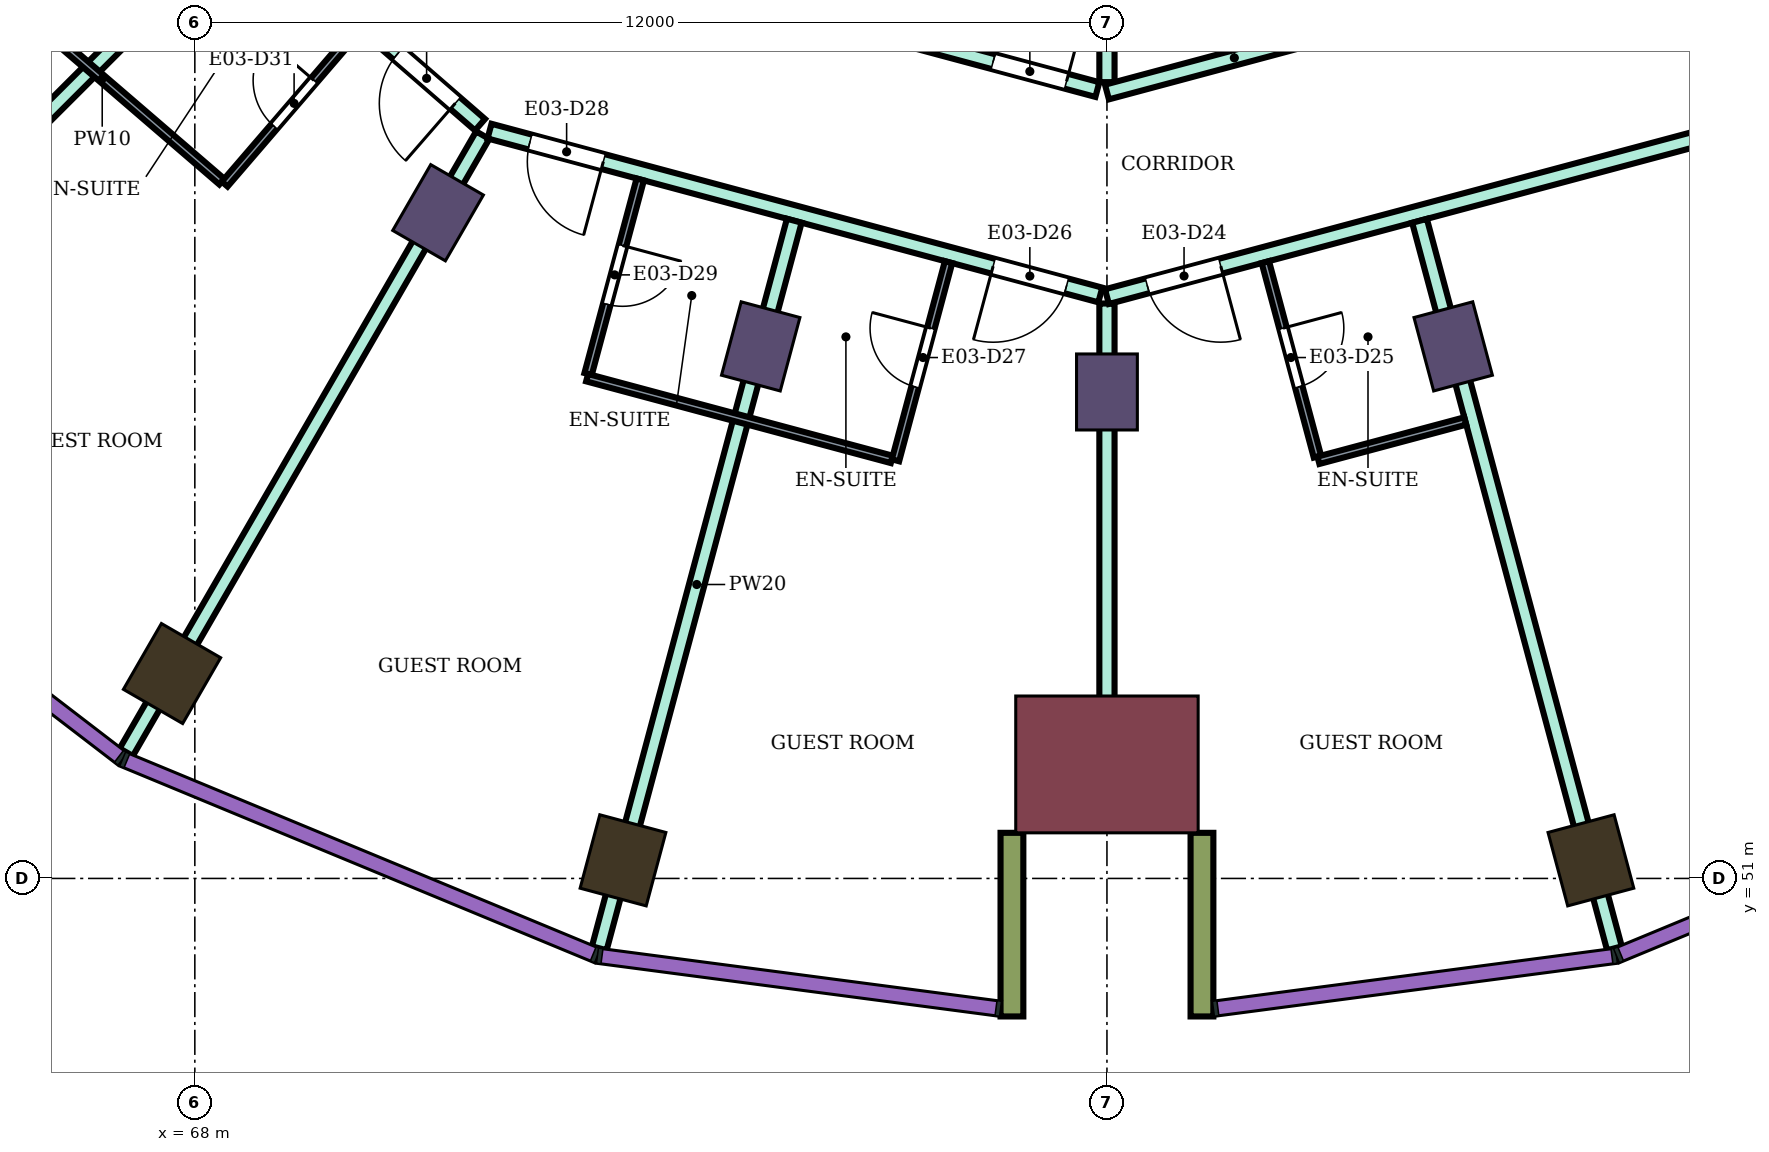
"""IFC4 building model, lengths in metres.
Left out: names, types, materials, properties, quantities, classifications, styles, units other than length and angle.
Written with IfcOpenShell. Run it as: python <this file> out.ifc"""

import sys

from ifc_helpers import new_model, si_unit, direction, frame, frame_2d, origin, origin_2d, place, context, subcontext, project, spatial, rectangle, extrude, element, fill, save


model = new_model("IFC4")
c1 = context("Model", 3, precision=1e-05, world=origin(), true_north=direction((0.0, 1.0)))
c2 = subcontext(c1, "Body", "Model", "MODEL_VIEW")
j1 = project(units=[si_unit("LENGTHUNIT", "METRE"), si_unit("PLANEANGLEUNIT", "RADIAN")], contexts=[c1])
p1 = place(None, origin())
s1 = spatial("IfcSite", under=j1, at=p1, CompositionType="ELEMENT")
p2 = place(p1, origin())
s2 = spatial("IfcBuilding", under=s1, at=p2, CompositionType="ELEMENT")
p3 = place(p2, frame((0.0, 0.0, 138.0)))
s3 = spatial("IfcBuildingStorey", under=s2, at=p3, CompositionType="ELEMENT", Elevation=138.0)
for number, where, z_axis, x_axis in (
    (1, (67.7, 53.696, 0.0), (0.0, 0.0, 1.0), (-0.5, -0.866, 0.0)),
    (2, (73.633, 51.238, 0.0), (0.0, 0.0, 1.0), (-0.259, -0.966, 0.0)),
    (3, (86.367, 51.238, 0.0), (0.0, 0.0, 1.0), (0.259, -0.966, 0.0)),
):
    element("IfcColumn", number, at=place(p3, frame(where, z_axis=z_axis, x_axis=x_axis)), inside=s3, PredefinedType="COLUMN", context=c2, shape_type="SweptSolid", body=[
        extrude(rectangle(XDim=1.0, YDim=0.9, at=origin_2d()), origin(), (0.0, 0.0, 1.0), 3.9),
    ])
for number, where, z_axis, x_axis in (
    (4, (71.2, 59.758, 0.0), (0.0, 0.0, 1.0), (-0.5, -0.866, 0.0)),
    (5, (75.445, 58.0, 0.0), (0.0, 0.0, 1.0), (-0.259, -0.966, 0.0)),
    (6, (80.0, 57.4, 0.0), (0.0, 0.0, 1.0), (0.0, -1.0, 0.0)),
    (7, (84.555, 58.0, 0.0), (0.0, 0.0, 1.0), (0.259, -0.966, 0.0)),
):
    element("IfcColumn", number, at=place(p3, frame(where, z_axis=z_axis, x_axis=x_axis)), inside=s3, PredefinedType="COLUMN", context=c2, shape_type="SweptSolid", body=[
        extrude(rectangle(XDim=1.0, YDim=0.8, at=origin_2d()), origin(), (0.0, 0.0, 1.0), 3.9),
    ])
p4 = place(p3, frame((80.0, 52.5, 0.0), z_axis=(0.0, 0.0, 1.0), x_axis=(0.0, -1.0, 0.0)))
e8 = element("IfcColumn", 8, at=p4, inside=s3, PredefinedType="COLUMN", context=c2, shape_type="SweptSolid", body=[
    extrude(rectangle(XDim=1.8, YDim=2.4, at=origin_2d()), origin(), (0.0, 0.0, 1.0), 3.9),
])
for number, where, z_axis, x_axis in (
    (9, (78.75, 51.6, 0.0), (0.0, 0.0, 1.0), (0.0, -1.0, 0.0)),
    (10, (81.25, 51.6, 0.0), (0.0, 0.0, 1.0), (0.0, -1.0, 0.0)),
):
    element("IfcWall", number, at=place(p3, frame(where, z_axis=z_axis, x_axis=x_axis)), inside=s3, PredefinedType="NOTDEFINED", context=c2, shape_type="SweptSolid", body=[
        extrude(rectangle(XDim=2.416, YDim=0.3, at=frame_2d((1.208, 0.0))), origin(), (0.0, 0.0, 1.0), 3.9),
    ])
p5 = place(p3, frame((63.593, 58.599, 0.0), z_axis=(0.0, 0.0, 1.0), x_axis=(0.707228748718, 0.706984792613, 0.0)))
e11 = element("IfcWall", 11, at=p5, inside=s3, PredefinedType="PARTITIONING", context=c2, shape_type="SweptSolid", body=[
    extrude(rectangle(XDim=7.005, YDim=0.2, at=frame_2d((3.503, 0.0))), origin(), (0.0, 0.0, 1.0), 3.45),
])
p6 = place(p3, frame((67.082, 64.972, 0.0), z_axis=(0.0, 0.0, 1.0), x_axis=(0.755031061605, -0.65568902386, 0.0)))
e12 = element("IfcWall", 12, at=p6, inside=s3, PredefinedType="PARTITIONING", context=c2, shape_type="SweptSolid", body=[
    extrude(rectangle(XDim=6.186, YDim=0.2, at=frame_2d((3.093, 0.0))), origin(), (0.0, 0.0, 1.0), 3.45),
])
p7 = place(p6, frame((4.755, 0.0, 0.0)))
e13 = element("IfcOpeningElement", 13, at=p7, cuts=e12, PredefinedType="OPENING", context=c2, shape_type="SweptSolid", body=[
    extrude(rectangle(XDim=1.0, YDim=2.1, at=frame_2d((0.5, 1.05))), frame((0.0, 0.11, 0.0), z_axis=(0.0, -1.0, 0.0), x_axis=(1.0, 0.0, 0.0)), (0.0, 0.0, 1.0), 0.22),
])
p8 = place(p3, frame((67.097, 52.661, 0.0), z_axis=(0.0, 0.0, 1.0), x_axis=(0.500236379769, 0.865888886841, 0.0)))
e14 = element("IfcWall", 14, at=p8, inside=s3, PredefinedType="PARTITIONING", context=c2, shape_type="SweptSolid", body=[
    extrude(rectangle(XDim=9.375, YDim=0.2, at=frame_2d((4.688, 0.0))), origin(), (0.0, 0.0, 1.0), 3.45),
])
p9 = place(p3, frame((71.877, 60.832, 0.0), z_axis=(0.0, 0.0, 1.0), x_axis=(0.965852509869, -0.259092510851, 0.0)))
e15 = element("IfcWall", 15, at=p9, inside=s3, PredefinedType="PARTITIONING", context=c2, shape_type="SweptSolid", body=[
    extrude(rectangle(XDim=8.32, YDim=0.2, at=frame_2d((4.16, 0.0))), origin(), (0.0, 0.0, 1.0), 3.45),
])
p10 = place(p9, frame((6.86, 0.0, 0.0)))
e16 = element("IfcOpeningElement", 16, at=p10, cuts=e15, PredefinedType="OPENING", context=c2, shape_type="SweptSolid", body=[
    extrude(rectangle(XDim=1.0, YDim=2.1, at=frame_2d((0.5, 1.05))), frame((0.0, 0.11, 0.0), z_axis=(0.0, -1.0, 0.0), x_axis=(1.0, 0.0, 0.0)), (0.0, 0.0, 1.0), 0.22),
])
p11 = place(p9, frame((0.55, 0.0, 0.0)))
e17 = element("IfcOpeningElement", 17, at=p11, cuts=e15, PredefinedType="OPENING", context=c2, shape_type="SweptSolid", body=[
    extrude(rectangle(XDim=1.0, YDim=2.1, at=frame_2d((0.5, 1.05))), frame((0.0, 0.11, 0.0), z_axis=(0.0, -1.0, 0.0), x_axis=(1.0, 0.0, 0.0)), (0.0, 0.0, 1.0), 0.22),
])
p12 = place(p3, frame((73.297, 63.143, 0.0), z_axis=(0.0, 0.0, 1.0), x_axis=(0.965859030528, -0.25906820173, 0.0)))
e18 = element("IfcWall", 18, at=p12, inside=s3, PredefinedType="PARTITIONING", context=c2, shape_type="SweptSolid", body=[
    extrude(rectangle(XDim=6.81, YDim=0.2, at=frame_2d((3.405, 0.0))), origin(), (0.0, 0.0, 1.0), 3.45),
])
p13 = place(p12, frame((5.39, 0.0, 0.0)))
e19 = element("IfcOpeningElement", 19, at=p13, cuts=e18, PredefinedType="OPENING", context=c2, shape_type="SweptSolid", body=[
    extrude(rectangle(XDim=1.0, YDim=2.1, at=frame_2d((0.5, 1.05))), frame((0.0, 0.11, 0.0), z_axis=(0.0, -1.0, 0.0), x_axis=(1.0, 0.0, 0.0)), (0.0, 0.0, 1.0), 0.22),
])
p14 = place(p3, frame((73.321, 50.081, 0.0), z_axis=(0.0, 0.0, 1.0), x_axis=(0.258889198551, 0.965907025999, 0.0)))
e20 = element("IfcWall", 20, at=p14, inside=s3, PredefinedType="PARTITIONING", context=c2, shape_type="SweptSolid", body=[
    extrude(rectangle(XDim=9.909, YDim=0.2, at=frame_2d((4.955, 0.0))), origin(), (0.0, 0.0, 1.0), 3.45),
])
p15 = place(p3, frame((80.0, 51.8, 0.0), z_axis=(0.0, 0.0, 1.0), x_axis=(0.0, 1.0, 0.0)))
e21 = element("IfcWall", 21, at=p15, inside=s3, PredefinedType="PARTITIONING", context=c2, shape_type="SweptSolid", body=[
    extrude(rectangle(XDim=6.764, YDim=0.2, at=frame_2d((3.382, 0.0))), origin(), (0.0, 0.0, 1.0), 3.45),
])
p16 = place(p3, frame((80.0, 58.654, 0.0), z_axis=(0.0, 0.0, 1.0), x_axis=(0.965979808777, 0.25861749561, 0.0)))
e22 = element("IfcWall", 22, at=p16, inside=s3, PredefinedType="PARTITIONING", context=c2, shape_type="SweptSolid", body=[
    extrude(rectangle(XDim=8.37, YDim=0.2, at=frame_2d((4.185, 0.0))), origin(), (0.0, 0.0, 1.0), 3.45),
])
p17 = place(p16, frame((0.55, 0.0, 0.0)))
e23 = element("IfcOpeningElement", 23, at=p17, cuts=e22, PredefinedType="OPENING", context=c2, shape_type="SweptSolid", body=[
    extrude(rectangle(XDim=1.0, YDim=2.1, at=frame_2d((0.5, 1.05))), frame((0.0, 0.11, 0.0), z_axis=(0.0, -1.0, 0.0), x_axis=(1.0, 0.0, 0.0)), (0.0, 0.0, 1.0), 0.22),
])
p18 = place(p3, frame((80.0, 61.476, 0.0), z_axis=(0.0, 0.0, 1.0), x_axis=(0.0, 1.0, 0.0)))
e24 = element("IfcWall", 24, at=p18, inside=s3, PredefinedType="PARTITIONING", context=c2, shape_type="SweptSolid", body=[
    extrude(rectangle(XDim=5.825, YDim=0.2, at=frame_2d((2.913, 0.0))), origin(), (0.0, 0.0, 1.0), 3.45),
])
p19 = place(p3, frame((80.0, 61.346, 0.0), z_axis=(0.0, 0.0, 1.0), x_axis=(0.965915385935, 0.25885800589, 0.0)))
e25 = element("IfcWall", 25, at=p19, inside=s3, PredefinedType="PARTITIONING", context=c2, shape_type="SweptSolid", body=[
    extrude(rectangle(XDim=6.94, YDim=0.2, at=frame_2d((3.47, 0.0))), origin(), (0.0, 0.0, 1.0), 3.45),
])
p20 = place(p19, frame((3.094, 0.0, 0.0)))
e26 = element("IfcOpeningElement", 26, at=p20, cuts=e25, PredefinedType="OPENING", context=c2, shape_type="SweptSolid", body=[
    extrude(rectangle(XDim=0.9, YDim=2.1, at=frame_2d((0.45, 1.05))), frame((0.0, 0.11, 0.0), z_axis=(0.0, -1.0, 0.0), x_axis=(1.0, 0.0, 0.0)), (0.0, 0.0, 1.0), 0.22),
])
p21 = place(p3, frame((84.112, 59.652, 0.0), z_axis=(0.0, 0.0, 1.0), x_axis=(0.25878658041, -0.965934524593, 0.0)))
e27 = element("IfcWall", 27, at=p21, inside=s3, PredefinedType="PARTITIONING", context=c2, shape_type="SweptSolid", body=[
    extrude(rectangle(XDim=9.909, YDim=0.2, at=frame_2d((4.954, 0.0))), origin(), (0.0, 0.0, 1.0), 3.45),
])
p22 = place(p3, frame((65.208, 62.875, 0.0), z_axis=(0.0, 0.0, 1.0), x_axis=(0.757943251005, -0.652320495045, 0.0)))
e28 = element("IfcWall", 28, at=p22, inside=s3, PredefinedType="PARTITIONING", context=c2, shape_type="SweptSolid", body=[
    extrude(rectangle(XDim=4.151, YDim=0.1, at=frame_2d((2.076, 0.0))), origin(), (0.0, 0.0, 1.0), 3.45),
])
p23 = place(p3, frame((68.393, 60.135, 0.0), z_axis=(0.0, 0.0, 1.0), x_axis=(0.652061182569, 0.758166349944, 0.0)))
e29 = element("IfcWall", 29, at=p23, inside=s3, PredefinedType="PARTITIONING", context=c2, shape_type="SweptSolid", body=[
    extrude(rectangle(XDim=2.69, YDim=0.1, at=frame_2d((1.345, 0.0))), origin(), (0.0, 0.0, 1.0), 3.45),
])
p24 = place(p23, frame((1.0, 0.0, 0.0)))
e30 = element("IfcOpeningElement", 30, at=p24, cuts=e29, PredefinedType="OPENING", context=c2, shape_type="SweptSolid", body=[
    extrude(rectangle(XDim=0.8, YDim=2.1, at=frame_2d((0.4, 1.05))), frame((0.0, 0.06, 0.0), z_axis=(0.0, -1.0, 0.0), x_axis=(1.0, 0.0, 0.0)), (0.0, 0.0, 1.0), 0.12),
])
p25 = place(p3, frame((73.174, 57.636, 0.0), z_axis=(0.0, 0.0, 1.0), x_axis=(0.258952498977, 0.96589005755, 0.0)))
e31 = element("IfcWall", 31, at=p25, inside=s3, PredefinedType="PARTITIONING", context=c2, shape_type="SweptSolid", body=[
    extrude(rectangle(XDim=2.65, YDim=0.1, at=frame_2d((1.325, 0.0))), origin(), (0.0, 0.0, 1.0), 3.45),
])
p26 = place(p25, frame((0.95, 0.0, 0.0)))
e32 = element("IfcOpeningElement", 32, at=p26, cuts=e31, PredefinedType="OPENING", context=c2, shape_type="SweptSolid", body=[
    extrude(rectangle(XDim=0.8, YDim=2.1, at=frame_2d((0.4, 1.05))), frame((0.0, 0.06, 0.0), z_axis=(0.0, -1.0, 0.0), x_axis=(1.0, 0.0, 0.0)), (0.0, 0.0, 1.0), 0.12),
])
p27 = place(p3, frame((73.161, 57.588, 0.0), z_axis=(0.0, 0.0, 1.0), x_axis=(0.965858994467, -0.259068336173, 0.0)))
e33 = element("IfcWall", 33, at=p27, inside=s3, PredefinedType="PARTITIONING", context=c2, shape_type="SweptSolid", body=[
    extrude(rectangle(XDim=4.15, YDim=0.1, at=frame_2d((2.075, 0.0))), origin(), (0.0, 0.0, 1.0), 3.45),
])
p28 = place(p3, frame((77.218, 56.501, 0.0), z_axis=(0.0, 0.0, 1.0), x_axis=(0.258591408257, 0.965986792651, 0.0)))
e34 = element("IfcWall", 34, at=p28, inside=s3, PredefinedType="PARTITIONING", context=c2, shape_type="SweptSolid", body=[
    extrude(rectangle(XDim=2.699, YDim=0.1, at=frame_2d((1.35, 0.0))), origin(), (0.0, 0.0, 1.0), 3.45),
])
p29 = place(p28, frame((1.0, 0.0, 0.0)))
e35 = element("IfcOpeningElement", 35, at=p29, cuts=e34, PredefinedType="OPENING", context=c2, shape_type="SweptSolid", body=[
    extrude(rectangle(XDim=0.8, YDim=2.1, at=frame_2d((0.4, 1.05))), frame((0.0, 0.06, 0.0), z_axis=(0.0, -1.0, 0.0), x_axis=(1.0, 0.0, 0.0)), (0.0, 0.0, 1.0), 0.12),
])
p30 = place(p3, frame((82.084, 59.108, 0.0), z_axis=(0.0, 0.0, 1.0), x_axis=(0.258591746437, -0.965986702121, 0.0)))
e36 = element("IfcWall", 36, at=p30, inside=s3, PredefinedType="PARTITIONING", context=c2, shape_type="SweptSolid", body=[
    extrude(rectangle(XDim=2.649, YDim=0.1, at=frame_2d((1.325, 0.0))), origin(), (0.0, 0.0, 1.0), 3.45),
])
p31 = place(p30, frame((0.9, 0.0, 0.0)))
e37 = element("IfcOpeningElement", 37, at=p31, cuts=e36, PredefinedType="OPENING", context=c2, shape_type="SweptSolid", body=[
    extrude(rectangle(XDim=0.8, YDim=2.1, at=frame_2d((0.4, 1.05))), frame((0.0, 0.06, 0.0), z_axis=(0.0, -1.0, 0.0), x_axis=(1.0, 0.0, 0.0)), (0.0, 0.0, 1.0), 0.12),
])
p32 = place(p3, frame((82.782, 56.501, 0.0), z_axis=(0.0, 0.0, 1.0), x_axis=(0.966003594778, 0.258528634539, 0.0)))
e38 = element("IfcWall", 38, at=p32, inside=s3, PredefinedType="PARTITIONING", context=c2, shape_type="SweptSolid", body=[
    extrude(rectangle(XDim=2.0, YDim=0.1, at=frame_2d((1.0, 0.0))), origin(), (0.0, 0.0, 1.0), 3.45),
])
p33 = place(p17, frame((1.0, 0.0, 0.0), z_axis=(0.0, 0.0, 1.0), x_axis=(-1.0, 0.0, 0.0)))
e39 = element("IfcDoor", 39, at=p33, inside=s3, OperationType="SINGLE_SWING_LEFT", PredefinedType="DOOR", context=c2, shape_type="SweptSolid", body=[
    extrude(rectangle(XDim=1.0, YDim=2.1, at=frame_2d((0.5, 1.05))), frame((0.0, 0.025, 0.0), z_axis=(0.0, -1.0, 0.0), x_axis=(1.0, 0.0, 0.0)), (0.0, 0.0, 1.0), 0.05),
])
fill(e23, e39)
p34 = place(p31, origin())
e40 = element("IfcDoor", 40, at=p34, inside=s3, OperationType="SINGLE_SWING_LEFT", PredefinedType="DOOR", context=c2, shape_type="SweptSolid", body=[
    extrude(rectangle(XDim=0.8, YDim=2.1, at=frame_2d((0.4, 1.05))), frame((0.0, 0.025, 0.0), z_axis=(0.0, -1.0, 0.0), x_axis=(1.0, 0.0, 0.0)), (0.0, 0.0, 1.0), 0.05),
])
fill(e37, e40)
p35 = place(p10, frame((1.0, 0.0, 0.0), z_axis=(0.0, 0.0, 1.0), x_axis=(-1.0, 0.0, 0.0)))
e41 = element("IfcDoor", 41, at=p35, inside=s3, OperationType="SINGLE_SWING_RIGHT", PredefinedType="DOOR", context=c2, shape_type="SweptSolid", body=[
    extrude(rectangle(XDim=1.0, YDim=2.1, at=frame_2d((0.5, 1.05))), frame((0.0, 0.025, 0.0), z_axis=(0.0, -1.0, 0.0), x_axis=(1.0, 0.0, 0.0)), (0.0, 0.0, 1.0), 0.05),
])
fill(e16, e41)
p36 = place(p29, origin())
e42 = element("IfcDoor", 42, at=p36, inside=s3, OperationType="SINGLE_SWING_RIGHT", PredefinedType="DOOR", context=c2, shape_type="SweptSolid", body=[
    extrude(rectangle(XDim=0.8, YDim=2.1, at=frame_2d((0.4, 1.05))), frame((0.0, 0.025, 0.0), z_axis=(0.0, -1.0, 0.0), x_axis=(1.0, 0.0, 0.0)), (0.0, 0.0, 1.0), 0.05),
])
fill(e35, e42)
p37 = place(p11, frame((1.0, 0.0, 0.0), z_axis=(0.0, 0.0, 1.0), x_axis=(-1.0, 0.0, 0.0)))
e43 = element("IfcDoor", 43, at=p37, inside=s3, OperationType="SINGLE_SWING_LEFT", PredefinedType="DOOR", context=c2, shape_type="SweptSolid", body=[
    extrude(rectangle(XDim=1.0, YDim=2.1, at=frame_2d((0.5, 1.05))), frame((0.0, 0.025, 0.0), z_axis=(0.0, -1.0, 0.0), x_axis=(1.0, 0.0, 0.0)), (0.0, 0.0, 1.0), 0.05),
])
fill(e17, e43)
p38 = place(p26, frame((0.8, 0.0, 0.0), z_axis=(0.0, 0.0, 1.0), x_axis=(-1.0, 0.0, 0.0)))
e44 = element("IfcDoor", 44, at=p38, inside=s3, OperationType="SINGLE_SWING_LEFT", PredefinedType="DOOR", context=c2, shape_type="SweptSolid", body=[
    extrude(rectangle(XDim=0.8, YDim=2.1, at=frame_2d((0.4, 1.05))), frame((0.0, 0.025, 0.0), z_axis=(0.0, -1.0, 0.0), x_axis=(1.0, 0.0, 0.0)), (0.0, 0.0, 1.0), 0.05),
])
fill(e32, e44)
p39 = place(p7, frame((1.0, 0.0, 0.0), z_axis=(0.0, 0.0, 1.0), x_axis=(-1.0, 0.0, 0.0)))
e45 = element("IfcDoor", 45, at=p39, inside=s3, OperationType="SINGLE_SWING_LEFT", PredefinedType="DOOR", context=c2, shape_type="SweptSolid", body=[
    extrude(rectangle(XDim=1.0, YDim=2.1, at=frame_2d((0.5, 1.05))), frame((0.0, 0.025, 0.0), z_axis=(0.0, -1.0, 0.0), x_axis=(1.0, 0.0, 0.0)), (0.0, 0.0, 1.0), 0.05),
])
fill(e13, e45)
p40 = place(p24, origin())
e46 = element("IfcDoor", 46, at=p40, inside=s3, OperationType="SINGLE_SWING_RIGHT", PredefinedType="DOOR", context=c2, shape_type="SweptSolid", body=[
    extrude(rectangle(XDim=0.8, YDim=2.1, at=frame_2d((0.4, 1.05))), frame((0.0, 0.025, 0.0), z_axis=(0.0, -1.0, 0.0), x_axis=(1.0, 0.0, 0.0)), (0.0, 0.0, 1.0), 0.05),
])
fill(e30, e46)
p41 = place(p13, origin())
e47 = element("IfcDoor", 47, at=p41, inside=s3, OperationType="SINGLE_SWING_RIGHT", PredefinedType="DOOR", context=c2, shape_type="SweptSolid", body=[
    extrude(rectangle(XDim=1.0, YDim=2.1, at=frame_2d((0.5, 1.05))), frame((0.0, 0.025, 0.0), z_axis=(0.0, -1.0, 0.0), x_axis=(1.0, 0.0, 0.0)), (0.0, 0.0, 1.0), 0.05),
])
fill(e19, e47)
save(model, sys.argv[1])
